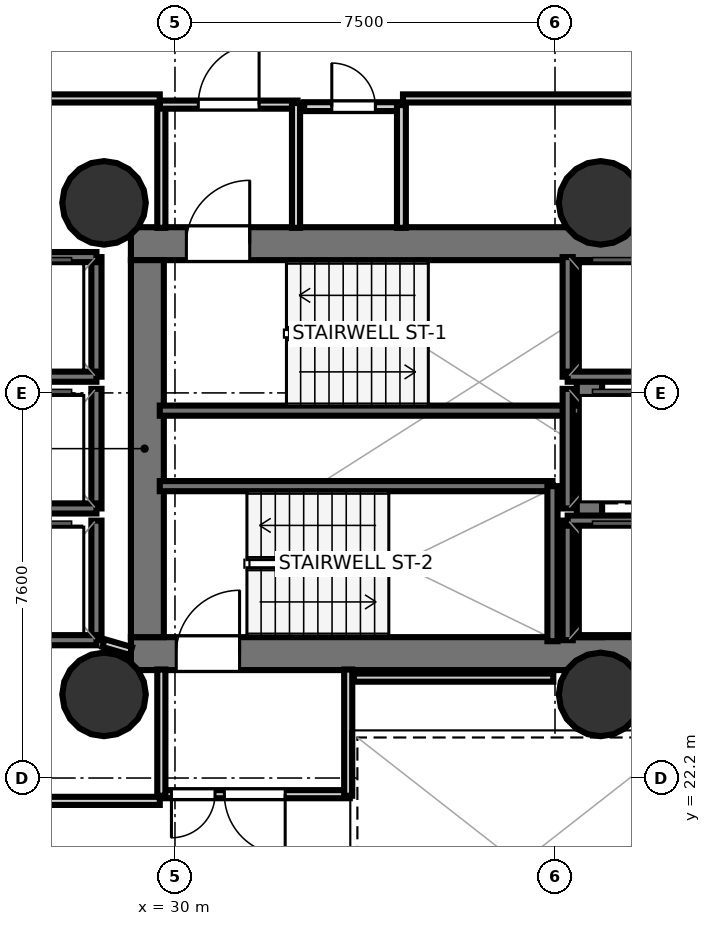
"""IFC4 building model, lengths in metres.
Left out: names, types, materials, properties, quantities, classifications, styles, units other than length and angle.
Written with IfcOpenShell. Run it as: python <this file> out.ifc"""

import sys

from ifc_helpers import new_model, si_unit, direction, frame, frame_2d, origin, origin_2d, place, context, subcontext, project, spatial, rectangle, hollow_circle, extrude, element, fill, save


model = new_model("IFC4")
c1 = context("Model", 3, precision=1e-05, world=origin(), true_north=direction((0.0, 1.0)))
c2 = subcontext(c1, "Body", "Model", "MODEL_VIEW")
j1 = project(units=[si_unit("LENGTHUNIT", "METRE"), si_unit("PLANEANGLEUNIT", "RADIAN")], contexts=[c1])
p1 = place(None, origin())
s1 = spatial("IfcSite", under=j1, at=p1, CompositionType="ELEMENT")
p2 = place(p1, origin())
s2 = spatial("IfcBuilding", under=s1, at=p2, CompositionType="ELEMENT")
p3 = place(p2, frame((0.0, 0.0, 52.5)))
s3 = spatial("IfcBuildingStorey", under=s2, at=p3, CompositionType="ELEMENT", Elevation=52.5)
p4 = place(p3, frame((29.13, 32.745, 0.0), z_axis=(0.0, 0.0, 1.0), x_axis=(1.0, 0.0, 0.0)))
e1 = element("IfcWall", 1, at=p4, inside=s3, PredefinedType="SHEAR", context=c2, shape_type="SweptSolid", body=[
    extrude(rectangle(XDim=10.72, YDim=0.65, at=frame_2d((5.36, 0.0))), origin(), (0.0, 0.0, 1.0), 3.52),
])
p5 = place(p4, frame((1.095, 0.0, 0.0)))
e2 = element("IfcOpeningElement", 2, at=p5, cuts=e1, PredefinedType="OPENING", context=c2, shape_type="SweptSolid", body=[
    extrude(rectangle(XDim=1.25, YDim=2.15, at=frame_2d((0.625, 1.075))), frame((0.0, 0.335, 0.0), z_axis=(0.0, -1.0, 0.0), x_axis=(1.0, 0.0, 0.0)), (0.0, 0.0, 1.0), 0.67),
])
p6 = place(p3, frame((29.13, 24.655, 0.0), z_axis=(0.0, 0.0, 1.0), x_axis=(1.0, 0.0, 0.0)))
e3 = element("IfcWall", 3, at=p6, inside=s3, PredefinedType="SHEAR", context=c2, shape_type="SweptSolid", body=[
    extrude(rectangle(XDim=10.72, YDim=0.65, at=frame_2d((5.36, 0.0))), origin(), (0.0, 0.0, 1.0), 3.52),
])
p7 = place(p6, frame((0.895, 0.0, 0.0)))
e4 = element("IfcOpeningElement", 4, at=p7, cuts=e3, PredefinedType="OPENING", context=c2, shape_type="SweptSolid", body=[
    extrude(rectangle(XDim=1.25, YDim=2.15, at=frame_2d((0.625, 1.075))), frame((0.0, 0.335, 0.0), z_axis=(0.0, -1.0, 0.0), x_axis=(1.0, 0.0, 0.0)), (0.0, 0.0, 1.0), 0.67),
])
p8 = place(p3, frame((29.455, 24.98, 0.0), z_axis=(0.0, 0.0, 1.0), x_axis=(0.0, 1.0, 0.0)))
e5 = element("IfcWall", 5, at=p8, inside=s3, PredefinedType="SHEAR", context=c2, shape_type="SweptSolid", body=[
    extrude(rectangle(XDim=7.44, YDim=0.65, at=frame_2d((3.72, 0.0))), origin(), (0.0, 0.0, 1.0), 3.52),
])
p9 = place(p3, frame((38.18, 24.98, 0.0), z_axis=(0.0, 0.0, 1.0), x_axis=(0.0, 1.0, 0.0)))
e6 = element("IfcWall", 6, at=p9, inside=s3, PredefinedType="SHEAR", context=c2, shape_type="SweptSolid", body=[
    extrude(rectangle(XDim=7.44, YDim=0.5, at=frame_2d((3.72, 0.0))), origin(), (0.0, 0.0, 1.0), 3.52),
])
for number, where, z_axis, x_axis in (
    (7, (28.6, 33.55, 0.0), (0.0, 0.0, 1.0), (1.0, 0.0, 0.0)),
    (8, (28.6, 23.85, 0.0), (0.0, 0.0, 1.0), (1.0, 0.0, 0.0)),
    (9, (38.4, 33.55, 0.0), (0.0, 0.0, 1.0), (1.0, 0.0, 0.0)),
    (10, (38.4, 23.85, 0.0), (0.0, 0.0, 1.0), (1.0, 0.0, 0.0)),
):
    element("IfcColumn", number, at=place(p3, frame(where, z_axis=z_axis, x_axis=x_axis)), inside=s3, PredefinedType="COLUMN", context=c2, shape_type="SweptSolid", body=[
        extrude(hollow_circle(Radius=0.825, WallThickness=0.04, at=origin_2d()), origin(), (0.0, 0.0, 1.0), 3.7),
    ])
p10 = place(p3, frame((29.7, 29.45, 0.0), z_axis=(0.0, 0.0, 1.0), x_axis=(1.0, 0.0, 0.0)))
e11 = element("IfcWall", 11, at=p10, inside=s3, PredefinedType="SOLIDWALL", context=c2, shape_type="SweptSolid", body=[
    extrude(rectangle(XDim=8.3, YDim=0.2, at=frame_2d((4.15, 0.0))), origin(), (0.0, 0.0, 1.0), 3.52),
])
p11 = place(p3, frame((29.7, 27.96, 0.0), z_axis=(0.0, 0.0, 1.0), x_axis=(1.0, 0.0, 0.0)))
e12 = element("IfcWall", 12, at=p11, inside=s3, PredefinedType="SOLIDWALL", context=c2, shape_type="SweptSolid", body=[
    extrude(rectangle(XDim=7.75, YDim=0.2, at=frame_2d((3.875, 0.0))), origin(), (0.0, 0.0, 1.0), 3.52),
])
p12 = place(p3, frame((37.45, 24.9, 0.0), z_axis=(0.0, 0.0, 1.0), x_axis=(0.0, 1.0, 0.0)))
e13 = element("IfcWall", 13, at=p12, inside=s3, PredefinedType="SOLIDWALL", context=c2, shape_type="SweptSolid", body=[
    extrude(rectangle(XDim=3.06, YDim=0.2, at=frame_2d((1.53, 0.0))), origin(), (0.0, 0.0, 1.0), 3.52),
])
p13 = place(p3, frame((37.75, 30.12, 0.0), z_axis=(0.0, 0.0, 1.0), x_axis=(0.0, 1.0, 0.0)))
e14 = element("IfcWall", 14, at=p13, inside=s3, PredefinedType="SOLIDWALL", context=c2, shape_type="SweptSolid", body=[
    extrude(rectangle(XDim=2.36, YDim=0.2, at=frame_2d((1.18, 0.0))), origin(), (0.0, 0.0, 1.0), 3.52),
])
p14 = place(p3, frame((37.75, 30.12, 0.0), z_axis=(0.0, 0.0, 1.0), x_axis=(1.0, 0.0, 0.0)))
e15 = element("IfcWall", 15, at=p14, inside=s3, PredefinedType="SOLIDWALL", context=c2, shape_type="SweptSolid", body=[
    extrude(rectangle(XDim=2.1, YDim=0.2, at=frame_2d((1.05, 0.0))), origin(), (0.0, 0.0, 1.0), 3.52),
])
p15 = place(p3, frame((37.75, 24.92, 0.0), z_axis=(0.0, 0.0, 1.0), x_axis=(0.0, 1.0, 0.0)))
e16 = element("IfcWall", 16, at=p15, inside=s3, PredefinedType="SOLIDWALL", context=c2, shape_type="SweptSolid", body=[
    extrude(rectangle(XDim=2.36, YDim=0.2, at=frame_2d((1.18, 0.0))), origin(), (0.0, 0.0, 1.0), 3.52),
])
p16 = place(p3, frame((37.75, 27.28, 0.0), z_axis=(0.0, 0.0, 1.0), x_axis=(1.0, 0.0, 0.0)))
e17 = element("IfcWall", 17, at=p16, inside=s3, PredefinedType="SOLIDWALL", context=c2, shape_type="SweptSolid", body=[
    extrude(rectangle(XDim=2.1, YDim=0.2, at=frame_2d((1.05, 0.0))), origin(), (0.0, 0.0, 1.0), 3.52),
])
p17 = place(p3, frame((28.45, 30.12, 0.0), z_axis=(0.0, 0.0, 1.0), x_axis=(0.0, 1.0, 0.0)))
e18 = element("IfcWall", 18, at=p17, inside=s3, PredefinedType="SOLIDWALL", context=c2, shape_type="SweptSolid", body=[
    extrude(rectangle(XDim=2.36, YDim=0.2, at=frame_2d((1.18, 0.0))), origin(), (0.0, 0.0, 1.0), 3.52),
])
for number, where, z_axis, x_axis in (
    (19, (26.35, 32.48, 0.0), (0.0, 0.0, 1.0), (1.0, 0.0, 0.0)),
    (20, (26.35, 30.12, 0.0), (0.0, 0.0, 1.0), (1.0, 0.0, 0.0)),
):
    element("IfcWall", number, at=place(p3, frame(where, z_axis=z_axis, x_axis=x_axis)), inside=s3, PredefinedType="SOLIDWALL", context=c2, shape_type="SweptSolid", body=[
        extrude(rectangle(XDim=2.1, YDim=0.2, at=frame_2d((1.05, 0.0))), origin(), (0.0, 0.0, 1.0), 3.52),
    ])
p18 = place(p3, frame((28.45, 27.52, 0.0), z_axis=(0.0, 0.0, 1.0), x_axis=(0.0, 1.0, 0.0)))
e21 = element("IfcWall", 21, at=p18, inside=s3, PredefinedType="SOLIDWALL", context=c2, shape_type="SweptSolid", body=[
    extrude(rectangle(XDim=2.36, YDim=0.2, at=frame_2d((1.18, 0.0))), origin(), (0.0, 0.0, 1.0), 3.52),
])
p19 = place(p3, frame((26.35, 27.52, 0.0), z_axis=(0.0, 0.0, 1.0), x_axis=(1.0, 0.0, 0.0)))
e22 = element("IfcWall", 22, at=p19, inside=s3, PredefinedType="SOLIDWALL", context=c2, shape_type="SweptSolid", body=[
    extrude(rectangle(XDim=2.1, YDim=0.2, at=frame_2d((1.05, 0.0))), origin(), (0.0, 0.0, 1.0), 3.52),
])
p20 = place(p3, frame((28.45, 24.92, 0.0), z_axis=(0.0, 0.0, 1.0), x_axis=(0.0, 1.0, 0.0)))
e23 = element("IfcWall", 23, at=p20, inside=s3, PredefinedType="SOLIDWALL", context=c2, shape_type="SweptSolid", body=[
    extrude(rectangle(XDim=2.36, YDim=0.2, at=frame_2d((1.18, 0.0))), origin(), (0.0, 0.0, 1.0), 3.52),
])
p21 = place(p3, frame((26.35, 24.92, 0.0), z_axis=(0.0, 0.0, 1.0), x_axis=(1.0, 0.0, 0.0)))
e24 = element("IfcWall", 24, at=p21, inside=s3, PredefinedType="SOLIDWALL", context=c2, shape_type="SweptSolid", body=[
    extrude(rectangle(XDim=2.1, YDim=0.2, at=frame_2d((1.05, 0.0))), origin(), (0.0, 0.0, 1.0), 3.52),
])
p22 = place(p3, frame((37.75, 27.52, 0.0), z_axis=(0.0, 0.0, 1.0), x_axis=(0.0, 1.0, 0.0)))
e25 = element("IfcWall", 25, at=p22, inside=s3, PredefinedType="SOLIDWALL", context=c2, shape_type="SweptSolid", body=[
    extrude(rectangle(XDim=2.36, YDim=0.2, at=frame_2d((1.18, 0.0))), origin(), (0.0, 0.0, 1.0), 3.52),
])
p23 = place(p3, frame((29.731, 33.058, 0.0), z_axis=(0.0, 0.0, 1.0), x_axis=(0.0, 1.0, 0.0)))
e26 = element("IfcWall", 26, at=p23, inside=s3, PredefinedType="PARTITIONING", context=c2, shape_type="SweptSolid", body=[
    extrude(rectangle(XDim=2.462, YDim=0.16, at=frame_2d((1.231, 0.0))), origin(), (0.0, 0.0, 1.0), 2.84),
])
p24 = place(p3, frame((29.7, 35.489, 0.0), z_axis=(0.0, 0.0, 1.0), x_axis=(1.0, 0.0, 0.0)))
e27 = element("IfcWall", 27, at=p24, inside=s3, PredefinedType="PARTITIONING", context=c2, shape_type="SweptSolid", body=[
    extrude(rectangle(XDim=2.72, YDim=0.16, at=frame_2d((1.36, 0.0))), origin(), (0.0, 0.0, 1.0), 2.84),
])
p25 = place(p24, frame((0.76, 0.0, 0.0)))
e28 = element("IfcOpeningElement", 28, at=p25, cuts=e27, PredefinedType="OPENING", context=c2, shape_type="SweptSolid", body=[
    extrude(rectangle(XDim=1.2, YDim=2.15, at=frame_2d((0.6, 1.075))), frame((0.0, 0.09, 0.0), z_axis=(0.0, -1.0, 0.0), x_axis=(1.0, 0.0, 0.0)), (0.0, 0.0, 1.0), 0.18),
])
p26 = place(p3, frame((32.389, 35.52, 0.0), z_axis=(0.0, 0.0, 1.0), x_axis=(0.0, -1.0, 0.0)))
e29 = element("IfcWall", 29, at=p26, inside=s3, PredefinedType="PARTITIONING", context=c2, shape_type="SweptSolid", body=[
    extrude(rectangle(XDim=2.462, YDim=0.16, at=frame_2d((1.231, 0.0))), origin(), (0.0, 0.0, 1.0), 2.84),
])
p27 = place(p3, frame((33.45, 21.881, 0.0), z_axis=(0.0, 0.0, 1.0), x_axis=(-1.0, 0.0, 0.0)))
e30 = element("IfcWall", 30, at=p27, inside=s3, PredefinedType="PARTITIONING", context=c2, shape_type="SweptSolid", body=[
    extrude(rectangle(XDim=3.75, YDim=0.16, at=frame_2d((1.875, 0.0))), origin(), (0.0, 0.0, 1.0), 2.84),
])
p28 = place(p27, frame((1.275, 0.0, 0.0)))
e31 = element("IfcOpeningElement", 31, at=p28, cuts=e30, PredefinedType="OPENING", context=c2, shape_type="SweptSolid", body=[
    extrude(rectangle(XDim=1.2, YDim=2.15, at=frame_2d((0.6, 1.075))), frame((0.0, 0.09, 0.0), z_axis=(0.0, -1.0, 0.0), x_axis=(1.0, 0.0, 0.0)), (0.0, 0.0, 1.0), 0.18),
])
p29 = place(p27, frame((2.66, 0.0, 0.0)))
e32 = element("IfcOpeningElement", 32, at=p29, cuts=e30, PredefinedType="OPENING", context=c2, shape_type="SweptSolid", body=[
    extrude(rectangle(XDim=0.86, YDim=2.05, at=frame_2d((0.43, 1.025))), frame((0.0, 0.09, 0.0), z_axis=(0.0, -1.0, 0.0), x_axis=(1.0, 0.0, 0.0)), (0.0, 0.0, 1.0), 0.18),
])
for number, where, z_axis, x_axis in (
    (33, (29.731, 21.85, 0.0), (0.0, 0.0, 1.0), (0.0, 1.0, 0.0)),
    (34, (33.419, 24.342, 0.0), (0.0, 0.0, 1.0), (0.0, -1.0, 0.0)),
):
    element("IfcWall", number, at=place(p3, frame(where, z_axis=z_axis, x_axis=x_axis)), inside=s3, PredefinedType="PARTITIONING", context=c2, shape_type="SweptSolid", body=[
        extrude(rectangle(XDim=2.492, YDim=0.16, at=frame_2d((1.246, 0.0))), origin(), (0.0, 0.0, 1.0), 2.84),
    ])
p30 = place(p3, frame((32.55, 35.449, 0.0), z_axis=(0.0, 0.0, 1.0), x_axis=(1.0, 0.0, 0.0)))
e35 = element("IfcWall", 35, at=p30, inside=s3, PredefinedType="PLUMBINGWALL", context=c2, shape_type="SweptSolid", body=[
    extrude(rectangle(XDim=1.95, YDim=0.175, at=frame_2d((0.975, 0.0))), origin(), (0.0, 0.0, 1.0), 2.84),
])
p31 = place(p30, frame((0.545, 0.0, 0.0)))
e36 = element("IfcOpeningElement", 36, at=p31, cuts=e35, PredefinedType="OPENING", context=c2, shape_type="SweptSolid", body=[
    extrude(rectangle(XDim=0.86, YDim=2.05, at=frame_2d((0.43, 1.025))), frame((0.0, 0.097, 0.0), z_axis=(0.0, -1.0, 0.0), x_axis=(1.0, 0.0, 0.0)), (0.0, 0.0, 1.0), 0.195),
])
p32 = place(p3, frame((34.469, 35.48, 0.0), z_axis=(0.0, 0.0, 1.0), x_axis=(0.0, -1.0, 0.0)))
e37 = element("IfcWall", 37, at=p32, inside=s3, PredefinedType="PLUMBINGWALL", context=c2, shape_type="SweptSolid", body=[
    extrude(rectangle(XDim=2.422, YDim=0.175, at=frame_2d((1.211, 0.0))), origin(), (0.0, 0.0, 1.0), 2.84),
])
p33 = place(p3, frame((29.13, 24.706, 0.0), z_axis=(0.0, 0.0, 1.0), x_axis=(-0.960451214223, 0.278448316742, 0.0)))
e38 = element("IfcWall", 38, at=p33, inside=s3, PredefinedType="PARTITIONING", context=c2, shape_type="SweptSolid", body=[
    extrude(rectangle(XDim=0.562, YDim=0.16, at=frame_2d((0.281, 0.0))), origin(), (0.0, 0.0, 1.0), 2.84),
])
p34 = place(p3, frame((37.467, 24.181, 0.0), z_axis=(0.0, 0.0, 1.0), x_axis=(-1.0, 0.0, 0.0)))
e39 = element("IfcWall", 39, at=p34, inside=s3, PredefinedType="PARTITIONING", context=c2, shape_type="SweptSolid", body=[
    extrude(rectangle(XDim=3.937, YDim=0.16, at=frame_2d((1.968, 0.0))), origin(), (0.0, 0.0, 1.0), 2.84),
])
p35 = place(p3, frame((39.818, 35.611, 0.0), z_axis=(0.0, 0.0, 1.0), x_axis=(-1.0, 0.0, 0.0)))
e40 = element("IfcWall", 40, at=p35, inside=s3, PredefinedType="PARTITIONING", context=c2, shape_type="SweptSolid", body=[
    extrude(rectangle(XDim=5.318, YDim=0.16, at=frame_2d((2.659, 0.0))), origin(), (0.0, 0.0, 1.0), 2.84),
])
p36 = place(p3, frame((29.7, 35.611, 0.0), z_axis=(0.0, 0.0, 1.0), x_axis=(-1.0, 0.0, 0.0)))
e41 = element("IfcWall", 41, at=p36, inside=s3, PredefinedType="PARTITIONING", context=c2, shape_type="SweptSolid", body=[
    extrude(rectangle(XDim=3.28, YDim=0.16, at=frame_2d((1.64, 0.0))), origin(), (0.0, 0.0, 1.0), 2.798),
])
p37 = place(p3, frame((26.42, 21.749, 0.0), z_axis=(0.0, 0.0, 1.0), x_axis=(1.0, 0.0, 0.0)))
e42 = element("IfcWall", 42, at=p37, inside=s3, PredefinedType="PARTITIONING", context=c2, shape_type="SweptSolid", body=[
    extrude(rectangle(XDim=3.28, YDim=0.16, at=frame_2d((1.64, 0.0))), origin(), (0.0, 0.0, 1.0), 2.84),
])
p38 = place(p3, frame((37.508, 44.57, 0.0), z_axis=(0.0, 0.0, 1.0), x_axis=(0.707905248795, -0.706307410926, 0.0)))
e43 = element("IfcWall", 43, at=p38, inside=s3, PredefinedType="PARTITIONING", context=c2, shape_type="SweptSolid", body=[
    extrude(rectangle(XDim=11.612, YDim=0.14, at=frame_2d((5.806, 0.0))), origin(), (0.0, 0.0, 1.0), 2.84),
])
p39 = place(p5, origin())
e44 = element("IfcDoor", 44, at=p39, inside=s3, OperationType="SINGLE_SWING_RIGHT", PredefinedType="DOOR", context=c2, shape_type="SweptSolid", body=[
    extrude(rectangle(XDim=1.25, YDim=2.15, at=frame_2d((0.625, 1.075))), frame((0.0, 0.025, 0.0), z_axis=(0.0, -1.0, 0.0), x_axis=(1.0, 0.0, 0.0)), (0.0, 0.0, 1.0), 0.05),
])
fill(e2, e44)
p40 = place(p7, origin())
e45 = element("IfcDoor", 45, at=p40, inside=s3, OperationType="SINGLE_SWING_RIGHT", PredefinedType="DOOR", context=c2, shape_type="SweptSolid", body=[
    extrude(rectangle(XDim=1.25, YDim=2.15, at=frame_2d((0.625, 1.075))), frame((0.0, 0.025, 0.0), z_axis=(0.0, -1.0, 0.0), x_axis=(1.0, 0.0, 0.0)), (0.0, 0.0, 1.0), 0.05),
])
fill(e4, e45)
p41 = place(p25, origin())
e46 = element("IfcDoor", 46, at=p41, inside=s3, OperationType="SINGLE_SWING_RIGHT", PredefinedType="DOOR", context=c2, shape_type="SweptSolid", body=[
    extrude(rectangle(XDim=1.2, YDim=2.15, at=frame_2d((0.6, 1.075))), frame((0.0, 0.025, 0.0), z_axis=(0.0, -1.0, 0.0), x_axis=(1.0, 0.0, 0.0)), (0.0, 0.0, 1.0), 0.05),
])
fill(e28, e46)
p42 = place(p28, origin())
e47 = element("IfcDoor", 47, at=p42, inside=s3, OperationType="SINGLE_SWING_LEFT", PredefinedType="DOOR", context=c2, shape_type="SweptSolid", body=[
    extrude(rectangle(XDim=1.2, YDim=2.15, at=frame_2d((0.6, 1.075))), frame((0.0, 0.025, 0.0), z_axis=(0.0, -1.0, 0.0), x_axis=(1.0, 0.0, 0.0)), (0.0, 0.0, 1.0), 0.05),
])
fill(e31, e47)
p43 = place(p31, origin())
e48 = element("IfcDoor", 48, at=p43, inside=s3, OperationType="SINGLE_SWING_LEFT", PredefinedType="DOOR", context=c2, shape_type="SweptSolid", body=[
    extrude(rectangle(XDim=0.86, YDim=2.05, at=frame_2d((0.43, 1.025))), frame((0.0, 0.025, 0.0), z_axis=(0.0, -1.0, 0.0), x_axis=(1.0, 0.0, 0.0)), (0.0, 0.0, 1.0), 0.05),
])
fill(e36, e48)
p44 = place(p29, origin())
e49 = element("IfcDoor", 49, at=p44, inside=s3, OperationType="SINGLE_SWING_RIGHT", PredefinedType="DOOR", context=c2, shape_type="SweptSolid", body=[
    extrude(rectangle(XDim=0.86, YDim=2.05, at=frame_2d((0.43, 1.025))), frame((0.0, 0.025, 0.0), z_axis=(0.0, -1.0, 0.0), x_axis=(1.0, 0.0, 0.0)), (0.0, 0.0, 1.0), 0.05),
])
fill(e32, e49)
save(model, sys.argv[1])
